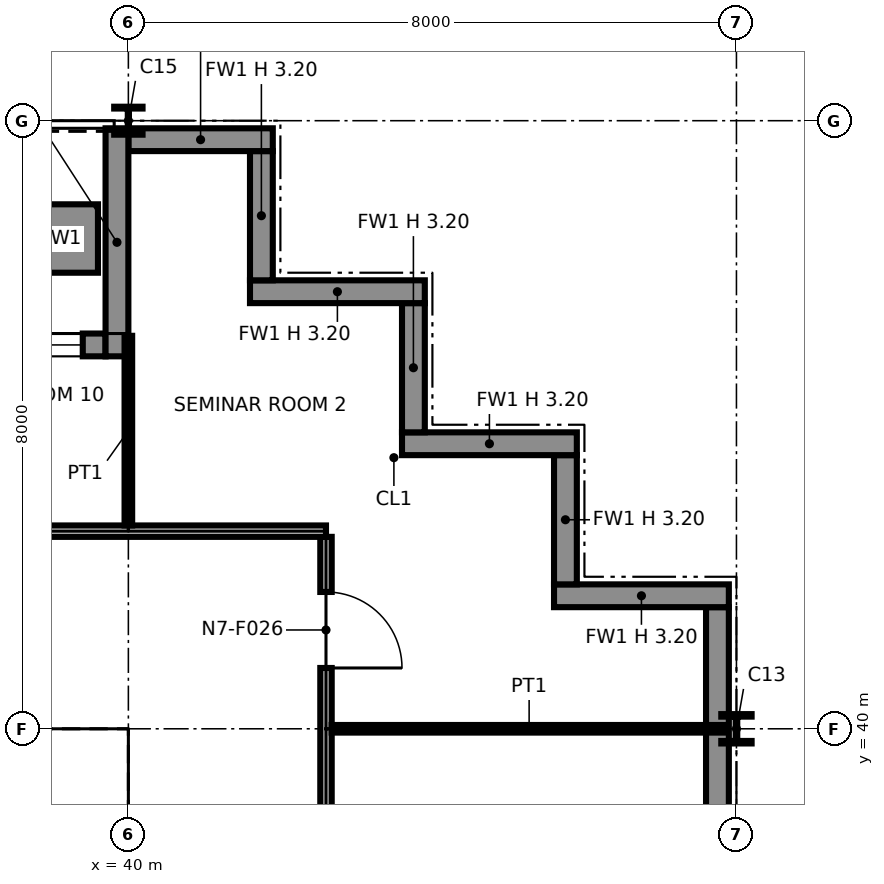
"""IFC4 building model, lengths in metres.
Left out: names, types, materials, properties, quantities, classifications, styles, units other than length and angle.
Written with IfcOpenShell. Run it as: python <this file> out.ifc"""

import sys

from ifc_helpers import new_model, si_unit, direction, frame, frame_2d, origin, origin_2d, place, context, subcontext, project, spatial, polyline, rectangle, i_section, outline, extrude, element, fill, save


model = new_model("IFC4")
c1 = context("Model", 3, precision=1e-05, world=origin(), true_north=direction((0.0, 1.0)))
c2 = subcontext(c1, "Body", "Model", "MODEL_VIEW")
j1 = project(units=[si_unit("LENGTHUNIT", "METRE"), si_unit("PLANEANGLEUNIT", "RADIAN")], contexts=[c1])
p1 = place(None, origin())
s1 = spatial("IfcSite", under=j1, at=p1, CompositionType="ELEMENT")
p2 = place(p1, origin())
s2 = spatial("IfcBuilding", under=s1, at=p2, CompositionType="ELEMENT")
p3 = place(p2, frame((0.0, 0.0, 109.6)))
s3 = spatial("IfcBuildingStorey", under=s2, at=p3, CompositionType="ELEMENT", Elevation=109.6)
p4 = place(p3, frame((40.0, 40.0, 0.0), z_axis=(0.0, 0.0, 1.0), x_axis=(1.0, 0.0, 0.0)))
e1 = element("IfcColumn", 1, at=p4, inside=s3, PredefinedType="COLUMN", context=c2, shape_type="SweptSolid", body=[
    extrude(i_section(OverallWidth=0.257, OverallDepth=0.363, WebThickness=0.013, FlangeThickness=0.022, at=origin_2d()), origin(), (0.0, 0.0, 1.0), 4.15),
])
p5 = place(p3, frame((40.0, 48.0, 0.0), z_axis=(0.0, 0.0, 1.0), x_axis=(1.0, 0.0, 0.0)))
e2 = element("IfcColumn", 2, at=p5, inside=s3, PredefinedType="COLUMN", context=c2, shape_type="SweptSolid", body=[
    extrude(i_section(OverallWidth=0.373, OverallDepth=0.368, WebThickness=0.015, FlangeThickness=0.024, at=origin_2d()), origin(), (0.0, 0.0, 1.0), 4.15),
])
p6 = place(p3, frame((48.0, 40.0, 0.0), z_axis=(0.0, 0.0, 1.0), x_axis=(1.0, 0.0, 0.0)))
e3 = element("IfcColumn", 3, at=p6, inside=s3, PredefinedType="COLUMN", context=c2, shape_type="SweptSolid", body=[
    extrude(i_section(OverallWidth=0.399, OverallDepth=0.386, WebThickness=0.021, FlangeThickness=0.033, at=origin_2d()), origin(), (0.0, 0.0, 1.0), 4.15),
])
p7 = place(p3, frame((47.75, 32.0, 0.0), z_axis=(0.0, 0.0, 1.0), x_axis=(0.0, 1.0, 0.0)))
e4 = element("IfcWall", 4, at=p7, inside=s3, PredefinedType="SOLIDWALL", context=c2, shape_type="SweptSolid", body=[
    extrude(rectangle(XDim=9.6, YDim=0.3, at=frame_2d((4.8, 0.0))), origin(), (0.0, 0.0, 1.0), 3.199),
])
p8 = place(p3, frame((47.9, 41.75, 0.0), z_axis=(0.0, 0.0, 1.0), x_axis=(-1.0, 0.0, 0.0)))
e5 = element("IfcWall", 5, at=p8, inside=s3, PredefinedType="SOLIDWALL", context=c2, shape_type="SweptSolid", body=[
    extrude(rectangle(XDim=2.3, YDim=0.3, at=frame_2d((1.15, 0.0))), origin(), (0.0, 0.0, 1.0), 3.199),
])
p9 = place(p3, frame((45.75, 41.9, 0.0), z_axis=(0.0, 0.0, 1.0), x_axis=(0.0, 1.0, 0.0)))
e6 = element("IfcWall", 6, at=p9, inside=s3, PredefinedType="SOLIDWALL", context=c2, shape_type="SweptSolid", body=[
    extrude(rectangle(XDim=1.7, YDim=0.3, at=frame_2d((0.85, 0.0))), origin(), (0.0, 0.0, 1.0), 3.199),
])
p10 = place(p3, frame((45.9, 43.75, 0.0), z_axis=(0.0, 0.0, 1.0), x_axis=(-1.0, 0.0, 0.0)))
e7 = element("IfcWall", 7, at=p10, inside=s3, PredefinedType="SOLIDWALL", context=c2, shape_type="SweptSolid", body=[
    extrude(rectangle(XDim=2.3, YDim=0.3, at=frame_2d((1.15, 0.0))), origin(), (0.0, 0.0, 1.0), 3.199),
])
p11 = place(p3, frame((43.75, 43.9, 0.0), z_axis=(0.0, 0.0, 1.0), x_axis=(0.0, 1.0, 0.0)))
e8 = element("IfcWall", 8, at=p11, inside=s3, PredefinedType="SOLIDWALL", context=c2, shape_type="SweptSolid", body=[
    extrude(rectangle(XDim=1.7, YDim=0.3, at=frame_2d((0.85, 0.0))), origin(), (0.0, 0.0, 1.0), 3.199),
])
p12 = place(p3, frame((43.9, 45.75, 0.0), z_axis=(0.0, 0.0, 1.0), x_axis=(-1.0, 0.0, 0.0)))
e9 = element("IfcWall", 9, at=p12, inside=s3, PredefinedType="SOLIDWALL", context=c2, shape_type="SweptSolid", body=[
    extrude(rectangle(XDim=2.3, YDim=0.3, at=frame_2d((1.15, 0.0))), origin(), (0.0, 0.0, 1.0), 3.199),
])
p13 = place(p3, frame((41.75, 45.9, 0.0), z_axis=(0.0, 0.0, 1.0), x_axis=(0.0, 1.0, 0.0)))
e10 = element("IfcWall", 10, at=p13, inside=s3, PredefinedType="SOLIDWALL", context=c2, shape_type="SweptSolid", body=[
    extrude(rectangle(XDim=1.7, YDim=0.3, at=frame_2d((0.85, 0.0))), origin(), (0.0, 0.0, 1.0), 3.199),
])
p14 = place(p3, frame((41.9, 47.75, 0.0), z_axis=(0.0, 0.0, 1.0), x_axis=(-1.0, 0.0, 0.0)))
e11 = element("IfcWall", 11, at=p14, inside=s3, PredefinedType="SOLIDWALL", context=c2, shape_type="SweptSolid", body=[
    extrude(rectangle(XDim=1.9, YDim=0.3, at=frame_2d((0.95, 0.0))), origin(), (0.0, 0.0, 1.0), 3.199),
])
p15 = place(p3, frame((39.7, 45.05, 0.0), z_axis=(0.0, 0.0, 1.0), x_axis=(-1.0, 0.0, 0.0)))
e12 = element("IfcWall", 12, at=p15, inside=s3, PredefinedType="SOLIDWALL", context=c2, shape_type="SweptSolid", body=[
    extrude(rectangle(XDim=7.4, YDim=0.3, at=frame_2d((3.7, 0.0))), origin(), (0.0, 0.0, 1.0), 4.15),
])
p16 = place(p15, frame((0.3, 0.0, 0.9)))
e13 = element("IfcOpeningElement", 13, at=p16, cuts=e12, PredefinedType="OPENING", context=c2, shape_type="SweptSolid", body=[
    extrude(rectangle(XDim=2.8, YDim=2.2, at=frame_2d((1.4, 1.1))), frame((0.0, 0.16, 0.0), z_axis=(0.0, -1.0, 0.0), x_axis=(1.0, 0.0, 0.0)), (0.0, 0.0, 1.0), 0.32),
])
p17 = place(p15, frame((4.7, 0.0, 0.0)))
e14 = element("IfcOpeningElement", 14, at=p17, cuts=e12, PredefinedType="OPENING", context=c2, shape_type="SweptSolid", body=[
    extrude(rectangle(XDim=2.0, YDim=2.4, at=frame_2d((1.0, 1.2))), frame((0.0, 0.16, 0.0), z_axis=(0.0, -1.0, 0.0), x_axis=(1.0, 0.0, 0.0)), (0.0, 0.0, 1.0), 0.32),
])
p18 = place(p3, frame((39.85, 47.9, 0.0), z_axis=(0.0, 0.0, 1.0), x_axis=(0.0, -1.0, 0.0)))
e15 = element("IfcWall", 15, at=p18, inside=s3, PredefinedType="SOLIDWALL", context=c2, shape_type="SweptSolid", body=[
    extrude(rectangle(XDim=3.0, YDim=0.3, at=frame_2d((1.5, 0.0))), origin(), (0.0, 0.0, 1.0), 3.199),
])
p19 = place(p3, frame((39.6, 46.45, 0.0), z_axis=(0.0, 0.0, 1.0), x_axis=(-1.0, 0.0, 0.0)))
e16 = element("IfcWall", 16, at=p19, inside=s3, PredefinedType="SOLIDWALL", context=c2, shape_type="SweptSolid", body=[
    extrude(rectangle(XDim=3.2, YDim=0.9, at=frame_2d((1.6, 0.0))), origin(), (0.0, 0.0, 1.0), 0.6),
])
p20 = place(p3, frame((24.65, 39.25, 0.0), z_axis=(0.0, 0.0, 1.0), x_axis=(1.0, 0.0, 0.0)))
e17 = element("IfcWall", 17, at=p20, inside=s3, PredefinedType="PARTITIONING", context=c2, shape_type="SweptSolid", body=[
    extrude(outline(polyline([(0.0, 0.0), (14.7, 0.0), (14.7, 4.15), (7.489, 4.15), (7.488, 3.382), (7.212, 3.382), (7.211, 4.15), (0.0, 4.15), (0.0, 0.0)])), frame((0.0, 0.1, 0.0), z_axis=(0.0, -1.0, 0.0), x_axis=(1.0, 0.0, 0.0)), (0.0, 0.0, 1.0), 0.2),
])
p21 = place(p3, frame((39.25, 32.85, 0.0), z_axis=(0.0, 0.0, 1.0), x_axis=(0.0, 1.0, 0.0)))
e18 = element("IfcWall", 18, at=p21, inside=s3, PredefinedType="PARTITIONING", context=c2, shape_type="SweptSolid", body=[
    extrude(rectangle(XDim=6.3, YDim=0.2, at=frame_2d((3.15, 0.0))), origin(), (0.0, 0.0, 1.0), 4.15),
])
p22 = place(p3, frame((42.6, 16.0, 0.0), z_axis=(0.0, 0.0, 1.0), x_axis=(0.0, 1.0, 0.0)))
e19 = element("IfcWall", 19, at=p22, inside=s3, PredefinedType="PARTITIONING", context=c2, shape_type="SweptSolid", body=[
    extrude(rectangle(XDim=26.525, YDim=0.15, at=frame_2d((13.262, 0.0))), origin(), (0.0, 0.0, 1.0), 3.194),
])
p23 = place(p22, frame((2.5, 0.0, 0.0), z_axis=(0.0, 0.0, 1.0), x_axis=(-1.0, 0.0, 0.0)))
e20 = element("IfcOpeningElement", 20, at=p23, cuts=e19, PredefinedType="OPENING", context=c2, shape_type="SweptSolid", body=[
    extrude(rectangle(XDim=1.0, YDim=2.1, at=frame_2d((0.5, 1.05))), frame((0.0, 0.085, 0.0), z_axis=(0.0, -1.0, 0.0), x_axis=(1.0, 0.0, 0.0)), (0.0, 0.0, 1.0), 0.17),
])
p24 = place(p22, frame((6.5, 0.0, 0.0), z_axis=(0.0, 0.0, 1.0), x_axis=(-1.0, 0.0, 0.0)))
e21 = element("IfcOpeningElement", 21, at=p24, cuts=e19, PredefinedType="OPENING", context=c2, shape_type="SweptSolid", body=[
    extrude(rectangle(XDim=1.0, YDim=2.1, at=frame_2d((0.5, 1.05))), frame((0.0, 0.085, 0.0), z_axis=(0.0, -1.0, 0.0), x_axis=(1.0, 0.0, 0.0)), (0.0, 0.0, 1.0), 0.17),
])
p25 = place(p22, frame((12.5, 0.0, 0.0), z_axis=(0.0, 0.0, 1.0), x_axis=(-1.0, 0.0, 0.0)))
e22 = element("IfcOpeningElement", 22, at=p25, cuts=e19, PredefinedType="OPENING", context=c2, shape_type="SweptSolid", body=[
    extrude(rectangle(XDim=1.0, YDim=2.1, at=frame_2d((0.5, 1.05))), frame((0.0, 0.085, 0.0), z_axis=(0.0, -1.0, 0.0), x_axis=(1.0, 0.0, 0.0)), (0.0, 0.0, 1.0), 0.17),
])
p26 = place(p22, frame((18.5, 0.0, 0.0), z_axis=(0.0, 0.0, 1.0), x_axis=(-1.0, 0.0, 0.0)))
e23 = element("IfcOpeningElement", 23, at=p26, cuts=e19, PredefinedType="OPENING", context=c2, shape_type="SweptSolid", body=[
    extrude(rectangle(XDim=1.0, YDim=2.1, at=frame_2d((0.5, 1.05))), frame((0.0, 0.085, 0.0), z_axis=(0.0, -1.0, 0.0), x_axis=(1.0, 0.0, 0.0)), (0.0, 0.0, 1.0), 0.17),
])
p27 = place(p22, frame((22.5, 0.0, 0.0), z_axis=(0.0, 0.0, 1.0), x_axis=(-1.0, 0.0, 0.0)))
e24 = element("IfcOpeningElement", 24, at=p27, cuts=e19, PredefinedType="OPENING", context=c2, shape_type="SweptSolid", body=[
    extrude(rectangle(XDim=1.0, YDim=2.1, at=frame_2d((0.5, 1.05))), frame((0.0, 0.085, 0.0), z_axis=(0.0, -1.0, 0.0), x_axis=(1.0, 0.0, 0.0)), (0.0, 0.0, 1.0), 0.17),
])
p28 = place(p22, frame((25.8, 0.0, 0.0), z_axis=(0.0, 0.0, 1.0), x_axis=(-1.0, 0.0, 0.0)))
e25 = element("IfcOpeningElement", 25, at=p28, cuts=e19, PredefinedType="OPENING", context=c2, shape_type="SweptSolid", body=[
    extrude(rectangle(XDim=1.0, YDim=2.1, at=frame_2d((0.5, 1.05))), frame((0.0, 0.085, 0.0), z_axis=(0.0, -1.0, 0.0), x_axis=(1.0, 0.0, 0.0)), (0.0, 0.0, 1.0), 0.17),
])
p29 = place(p3, frame((42.675, 40.0, 0.0), z_axis=(0.0, 0.0, 1.0), x_axis=(1.0, 0.0, 0.0)))
e26 = element("IfcWall", 26, at=p29, inside=s3, PredefinedType="PARTITIONING", context=c2, shape_type="SweptSolid", body=[
    extrude(rectangle(XDim=5.195, YDim=0.1, at=frame_2d((2.598, 0.0))), origin(), (0.0, 0.0, 1.0), 3.194),
])
p30 = place(p3, frame((8.05, 42.6, 0.0), z_axis=(0.0, 0.0, 1.0), x_axis=(1.0, 0.0, 0.0)))
e27 = element("IfcWall", 27, at=p30, inside=s3, PredefinedType="PARTITIONING", context=c2, shape_type="SweptSolid", body=[
    extrude(rectangle(XDim=34.55, YDim=0.15, at=frame_2d((17.275, 0.0))), origin(), (0.0, 0.0, 1.0), 3.194),
])
p31 = place(p30, frame((9.45, 0.0, 0.0)))
e28 = element("IfcOpeningElement", 28, at=p31, cuts=e27, PredefinedType="OPENING", context=c2, shape_type="SweptSolid", body=[
    extrude(rectangle(XDim=1.0, YDim=2.1, at=frame_2d((0.5, 1.05))), frame((0.0, 0.085, 0.0), z_axis=(0.0, -1.0, 0.0), x_axis=(1.0, 0.0, 0.0)), (0.0, 0.0, 1.0), 0.17),
])
p32 = place(p30, frame((13.45, 0.0, 0.0)))
e29 = element("IfcOpeningElement", 29, at=p32, cuts=e27, PredefinedType="OPENING", context=c2, shape_type="SweptSolid", body=[
    extrude(rectangle(XDim=1.0, YDim=2.1, at=frame_2d((0.5, 1.05))), frame((0.0, 0.085, 0.0), z_axis=(0.0, -1.0, 0.0), x_axis=(1.0, 0.0, 0.0)), (0.0, 0.0, 1.0), 0.17),
])
p33 = place(p30, frame((25.45, 0.0, 0.0)))
e30 = element("IfcOpeningElement", 30, at=p33, cuts=e27, PredefinedType="OPENING", context=c2, shape_type="SweptSolid", body=[
    extrude(rectangle(XDim=1.0, YDim=2.1, at=frame_2d((0.5, 1.05))), frame((0.0, 0.085, 0.0), z_axis=(0.0, -1.0, 0.0), x_axis=(1.0, 0.0, 0.0)), (0.0, 0.0, 1.0), 0.17),
])
p34 = place(p30, frame((29.45, 0.0, 0.0)))
e31 = element("IfcOpeningElement", 31, at=p34, cuts=e27, PredefinedType="OPENING", context=c2, shape_type="SweptSolid", body=[
    extrude(rectangle(XDim=1.0, YDim=2.1, at=frame_2d((0.5, 1.05))), frame((0.0, 0.085, 0.0), z_axis=(0.0, -1.0, 0.0), x_axis=(1.0, 0.0, 0.0)), (0.0, 0.0, 1.0), 0.17),
])
p35 = place(p30, frame((1.45, 0.0, 0.0)))
e32 = element("IfcOpeningElement", 32, at=p35, cuts=e27, PredefinedType="OPENING", context=c2, shape_type="SweptSolid", body=[
    extrude(rectangle(XDim=1.0, YDim=2.1, at=frame_2d((0.5, 1.05))), frame((0.0, 0.085, 0.0), z_axis=(0.0, -1.0, 0.0), x_axis=(1.0, 0.0, 0.0)), (0.0, 0.0, 1.0), 0.17),
])
p36 = place(p30, frame((5.45, 0.0, 0.0)))
e33 = element("IfcOpeningElement", 33, at=p36, cuts=e27, PredefinedType="OPENING", context=c2, shape_type="SweptSolid", body=[
    extrude(rectangle(XDim=1.0, YDim=2.1, at=frame_2d((0.5, 1.05))), frame((0.0, 0.085, 0.0), z_axis=(0.0, -1.0, 0.0), x_axis=(1.0, 0.0, 0.0)), (0.0, 0.0, 1.0), 0.17),
])
p37 = place(p30, frame((17.45, 0.0, 0.0)))
e34 = element("IfcOpeningElement", 34, at=p37, cuts=e27, PredefinedType="OPENING", context=c2, shape_type="SweptSolid", body=[
    extrude(rectangle(XDim=1.0, YDim=2.1, at=frame_2d((0.5, 1.05))), frame((0.0, 0.085, 0.0), z_axis=(0.0, -1.0, 0.0), x_axis=(1.0, 0.0, 0.0)), (0.0, 0.0, 1.0), 0.17),
])
p38 = place(p30, frame((21.45, 0.0, 0.0)))
e35 = element("IfcOpeningElement", 35, at=p38, cuts=e27, PredefinedType="OPENING", context=c2, shape_type="SweptSolid", body=[
    extrude(rectangle(XDim=1.0, YDim=2.1, at=frame_2d((0.5, 1.05))), frame((0.0, 0.085, 0.0), z_axis=(0.0, -1.0, 0.0), x_axis=(1.0, 0.0, 0.0)), (0.0, 0.0, 1.0), 0.17),
])
p39 = place(p3, frame((40.0, 42.675, 0.0), z_axis=(0.0, 0.0, 1.0), x_axis=(0.0, 1.0, 0.0)))
e36 = element("IfcWall", 36, at=p39, inside=s3, PredefinedType="PARTITIONING", context=c2, shape_type="SweptSolid", body=[
    extrude(rectangle(XDim=2.495, YDim=0.1, at=frame_2d((1.248, 0.0))), origin(), (0.0, 0.0, 1.0), 3.194),
])
p40 = place(p16, origin())
e37 = element("IfcWindow", 37, at=p40, inside=s3, PartitioningType="SINGLE_PANEL", PredefinedType="WINDOW", context=c2, shape_type="SweptSolid", body=[
    extrude(rectangle(XDim=2.8, YDim=2.2, at=frame_2d((1.4, 1.1))), frame((0.0, 0.03, 0.0), z_axis=(0.0, -1.0, 0.0), x_axis=(1.0, 0.0, 0.0)), (0.0, 0.0, 1.0), 0.06),
])
fill(e13, e37)
p41 = place(p28, origin())
e38 = element("IfcDoor", 38, at=p41, inside=s3, OperationType="SINGLE_SWING_RIGHT", PredefinedType="DOOR", context=c2, shape_type="SweptSolid", body=[
    extrude(rectangle(XDim=1.0, YDim=2.1, at=frame_2d((0.5, 1.05))), frame((0.0, 0.025, 0.0), z_axis=(0.0, -1.0, 0.0), x_axis=(1.0, 0.0, 0.0)), (0.0, 0.0, 1.0), 0.05),
])
fill(e25, e38)
save(model, sys.argv[1])
